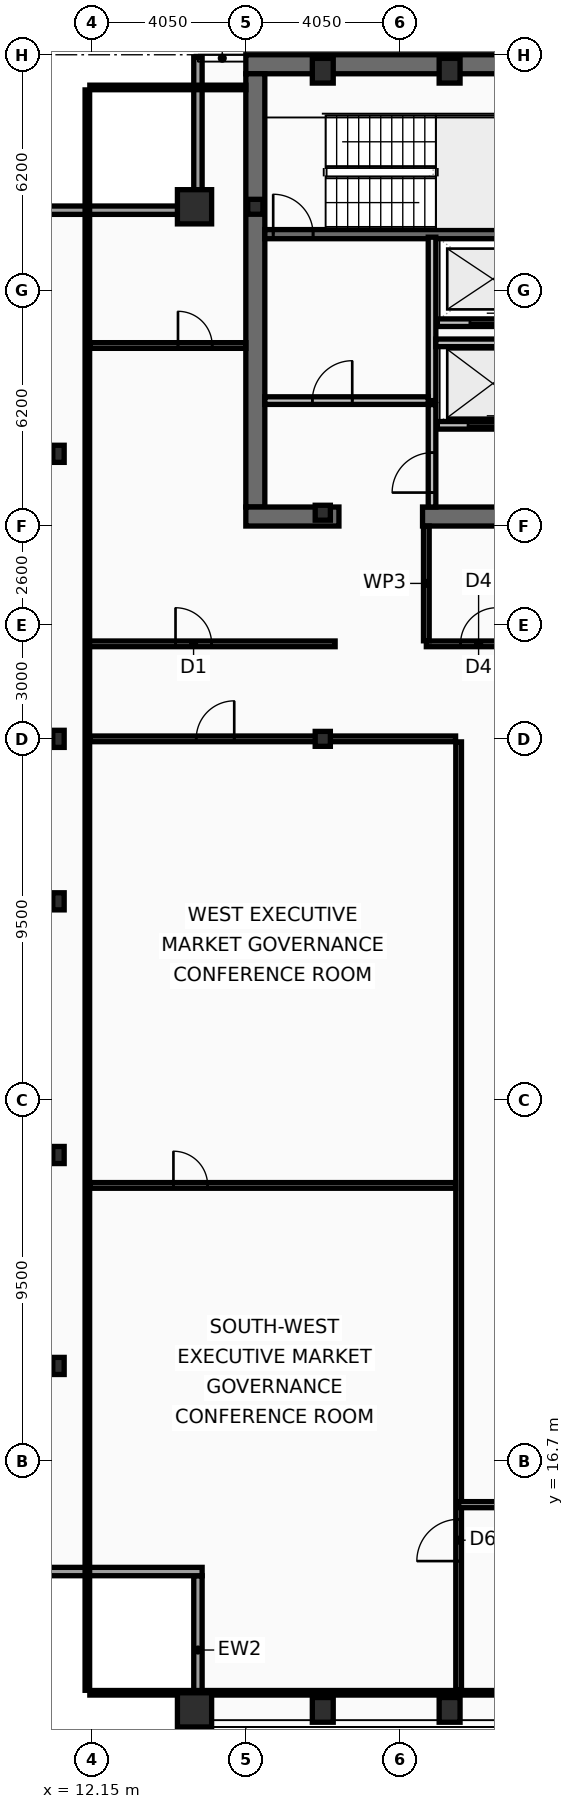
"""IFC4 building model, lengths in metres.
Left out: names, types, materials, properties, quantities, classifications, styles, units other than length and angle.
Written with IfcOpenShell. Run it as: python <this file> out.ifc"""

import sys

from ifc_helpers import new_model, si_unit, direction, frame, frame_2d, origin, origin_2d, place, context, subcontext, project, spatial, rectangle, hollow_rectangle, i_section, extrude, element, fill, save


model = new_model("IFC4")
c1 = context("Model", 3, precision=1e-05, world=origin(), true_north=direction((0.0, 1.0)))
c2 = subcontext(c1, "Body", "Model", "MODEL_VIEW")
j1 = project(units=[si_unit("LENGTHUNIT", "METRE"), si_unit("PLANEANGLEUNIT", "RADIAN")], contexts=[c1])
p1 = place(None, origin())
s1 = spatial("IfcSite", under=j1, at=p1, CompositionType="ELEMENT")
p2 = place(p1, origin())
s2 = spatial("IfcBuilding", under=s1, at=p2, CompositionType="ELEMENT")
p3 = place(p2, frame((0.0, 0.0, 347.0)))
s3 = spatial("IfcBuildingStorey", under=s2, at=p3, CompositionType="ELEMENT", Elevation=347.0)
p4 = place(p3, frame((16.2, 53.45, 0.0), z_axis=(0.0, 0.0, 1.0), x_axis=(1.0, 0.0, 0.0)))
e1 = element("IfcWall", 1, at=p4, inside=s3, PredefinedType="SHEAR", context=c2, shape_type="SweptSolid", body=[
    extrude(rectangle(XDim=40.5, YDim=0.5, at=frame_2d((20.25, 0.0))), origin(), (0.0, 0.0, 1.0), 3.38),
])
p5 = place(p3, frame((16.45, 41.8, 0.0), z_axis=(0.0, 0.0, 1.0), x_axis=(0.0, 1.0, 0.0)))
e2 = element("IfcWall", 2, at=p5, inside=s3, PredefinedType="SHEAR", context=c2, shape_type="SweptSolid", body=[
    extrude(rectangle(XDim=11.4, YDim=0.5, at=frame_2d((5.7, 0.0))), origin(), (0.0, 0.0, 1.0), 3.38),
])
p6 = place(p3, frame((18.65, 41.55, 0.0), z_axis=(0.0, 0.0, 1.0), x_axis=(-1.0, 0.0, 0.0)))
e3 = element("IfcWall", 3, at=p6, inside=s3, PredefinedType="SHEAR", context=c2, shape_type="SweptSolid", body=[
    extrude(rectangle(XDim=2.45, YDim=0.5, at=frame_2d((1.225, 0.0))), origin(), (0.0, 0.0, 1.0), 3.38),
])
p7 = place(p3, frame((32.3, 41.55, 0.0), z_axis=(0.0, 0.0, 1.0), x_axis=(-1.0, 0.0, 0.0)))
e4 = element("IfcWall", 4, at=p7, inside=s3, PredefinedType="SHEAR", context=c2, shape_type="SweptSolid", body=[
    extrude(rectangle(XDim=11.45, YDim=0.5, at=frame_2d((5.725, 0.0))), origin(), (0.0, 0.0, 1.0), 3.38),
])
p8 = place(p3, frame((16.7, 48.98, 0.0), z_axis=(0.0, 0.0, 1.0), x_axis=(1.0, 0.0, 0.0)))
e5 = element("IfcWall", 5, at=p8, inside=s3, PredefinedType="SHEAR", context=c2, shape_type="SweptSolid", body=[
    extrude(rectangle(XDim=7.52, YDim=0.24, at=frame_2d((3.76, 0.0))), origin(), (0.0, 0.0, 1.0), 3.38),
])
p9 = place(p8, frame((0.22, 0.0, 0.0)))
e6 = element("IfcOpeningElement", 6, at=p9, cuts=e5, PredefinedType="OPENING", context=c2, shape_type="SweptSolid", body=[
    extrude(rectangle(XDim=1.05, YDim=2.15, at=frame_2d((0.525, 1.075))), frame((0.0, 0.13, 0.0), z_axis=(0.0, -1.0, 0.0), x_axis=(1.0, 0.0, 0.0)), (0.0, 0.0, 1.0), 0.26),
])
for number, where, z_axis, x_axis in (
    (7, (14.85, 10.15, 0.0), (0.0, 0.0, 1.0), (1.0, 0.0, 0.0)),
    (8, (14.85, 49.7, 0.0), (0.0, 0.0, 1.0), (1.0, 0.0, 0.0)),
):
    element("IfcColumn", number, at=place(p3, frame(where, z_axis=z_axis, x_axis=x_axis)), inside=s3, PredefinedType="COLUMN", context=c2, shape_type="SweptSolid", body=[
        extrude(hollow_rectangle(XDim=0.9, YDim=0.9, WallThickness=0.05, at=origin_2d()), origin(), (0.0, 0.0, 1.0), 3.6),
    ])
for number, where, z_axis, x_axis in (
    (9, (18.225, 10.15, 0.0), (0.0, 0.0, 1.0), (1.0, 0.0, 0.0)),
    (10, (21.562, 10.15, 0.0), (0.0, 0.0, 1.0), (1.0, 0.0, 0.0)),
    (11, (18.225, 53.28, 0.0), (0.0, 0.0, 1.0), (1.0, 0.0, 0.0)),
    (12, (21.562, 53.28, 0.0), (0.0, 0.0, 1.0), (1.0, 0.0, 0.0)),
):
    element("IfcColumn", number, at=place(p3, frame(where, z_axis=z_axis, x_axis=x_axis)), inside=s3, PredefinedType="COLUMN", context=c2, shape_type="SweptSolid", body=[
        extrude(hollow_rectangle(XDim=0.55, YDim=0.65, WallThickness=0.04, at=origin_2d()), origin(), (0.0, 0.0, 1.0), 3.6),
    ])
for number, where, z_axis, x_axis in (
    (13, (11.27, 19.2, 0.0), (0.0, 0.0, 1.0), (1.0, 0.0, 0.0)),
    (14, (11.27, 24.75, 0.0), (0.0, 0.0, 1.0), (1.0, 0.0, 0.0)),
    (15, (11.27, 31.425, 0.0), (0.0, 0.0, 1.0), (1.0, 0.0, 0.0)),
    (16, (11.27, 35.7, 0.0), (0.0, 0.0, 1.0), (1.0, 0.0, 0.0)),
    (17, (11.27, 43.2, 0.0), (0.0, 0.0, 1.0), (1.0, 0.0, 0.0)),
):
    element("IfcColumn", number, at=place(p3, frame(where, z_axis=z_axis, x_axis=x_axis)), inside=s3, PredefinedType="COLUMN", context=c2, shape_type="SweptSolid", body=[
        extrude(i_section(OverallWidth=0.3, OverallDepth=0.45, WebThickness=0.014, FlangeThickness=0.026, at=origin_2d()), origin(), (0.0, 0.0, 1.0), 3.6),
    ])
for number, where, z_axis, x_axis in (
    (18, (16.45, 49.7, 0.0), (0.0, 0.0, 1.0), (1.0, 0.0, 0.0)),
    (19, (18.225, 35.7, 0.0), (0.0, 0.0, 1.0), (1.0, 0.0, 0.0)),
    (20, (18.225, 41.65, 0.0), (0.0, 0.0, 1.0), (1.0, 0.0, 0.0)),
):
    element("IfcColumn", number, at=place(p3, frame(where, z_axis=z_axis, x_axis=x_axis)), inside=s3, PredefinedType="COLUMN", context=c2, shape_type="SweptSolid", body=[
        extrude(i_section(OverallWidth=0.399, OverallDepth=0.393, WebThickness=0.023, FlangeThickness=0.037, at=origin_2d()), origin(), (0.0, 0.0, 1.0), 3.6),
    ])
p10 = place(p3, frame((14.94, 9.77, 0.0), z_axis=(0.0, 0.0, 1.0), x_axis=(0.0, 1.0, 0.0)))
e21 = element("IfcWall", 21, at=p10, inside=s3, PredefinedType="SOLIDWALL", context=c2, shape_type="SweptSolid", body=[
    extrude(rectangle(XDim=3.91, YDim=0.22, at=frame_2d((1.955, 0.0))), origin(), (0.0, 0.0, 1.0), 2.82),
])
for number, where, z_axis, x_axis in (
    (22, (15.05, 13.79, 0.0), (0.0, 0.0, 1.0), (-1.0, 0.0, 0.0)),
    (23, (10.92, 49.61, 0.0), (0.0, 0.0, 1.0), (1.0, 0.0, 0.0)),
):
    element("IfcWall", number, at=place(p3, frame(where, z_axis=z_axis, x_axis=x_axis)), inside=s3, PredefinedType="SOLIDWALL", context=c2, shape_type="SweptSolid", body=[
        extrude(rectangle(XDim=4.13, YDim=0.22, at=frame_2d((2.065, 0.0))), origin(), (0.0, 0.0, 1.0), 2.82),
    ])
p11 = place(p3, frame((14.94, 49.72, 0.0), z_axis=(0.0, 0.0, 1.0), x_axis=(0.0, 1.0, 0.0)))
e24 = element("IfcWall", 24, at=p11, inside=s3, PredefinedType="SOLIDWALL", context=c2, shape_type="SweptSolid", body=[
    extrude(rectangle(XDim=3.91, YDim=0.22, at=frame_2d((1.955, 0.0))), origin(), (0.0, 0.0, 1.0), 2.82),
])
p12 = place(p3, frame((24.21, 43.95, 0.0), z_axis=(0.0, 0.0, 1.0), x_axis=(-1.0, 0.0, 0.0)))
e25 = element("IfcWall", 25, at=p12, inside=s3, PredefinedType="PARTITIONING", context=c2, shape_type="SweptSolid", body=[
    extrude(rectangle(XDim=2.97, YDim=0.2, at=frame_2d((1.485, 0.0))), origin(), (0.0, 0.0, 1.0), 3.38),
])
p13 = place(p12, frame((0.86, 0.0, 0.0)))
e26 = element("IfcOpeningElement", 26, at=p13, cuts=e25, PredefinedType="OPENING", context=c2, shape_type="SweptSolid", body=[
    extrude(rectangle(XDim=1.3, YDim=2.18, at=frame_2d((0.65, 1.09))), frame((0.0, 0.11, 0.0), z_axis=(0.0, -1.0, 0.0), x_axis=(1.0, 0.0, 0.0)), (0.0, 0.0, 1.0), 0.22),
])
p14 = place(p3, frame((24.21, 46.65, 0.0), z_axis=(0.0, 0.0, 1.0), x_axis=(-1.0, 0.0, 0.0)))
e27 = element("IfcWall", 27, at=p14, inside=s3, PredefinedType="PARTITIONING", context=c2, shape_type="SweptSolid", body=[
    extrude(rectangle(XDim=2.97, YDim=0.2, at=frame_2d((1.485, 0.0))), origin(), (0.0, 0.0, 1.0), 3.38),
])
p15 = place(p14, frame((0.91, 0.0, 0.0)))
e28 = element("IfcOpeningElement", 28, at=p15, cuts=e27, PredefinedType="OPENING", context=c2, shape_type="SweptSolid", body=[
    extrude(rectangle(XDim=1.2, YDim=2.18, at=frame_2d((0.6, 1.09))), frame((0.0, 0.11, 0.0), z_axis=(0.0, -1.0, 0.0), x_axis=(1.0, 0.0, 0.0)), (0.0, 0.0, 1.0), 0.22),
])
p16 = place(p3, frame((21.1, 44.6, 0.0), z_axis=(0.0, 0.0, 1.0), x_axis=(0.0, 1.0, 0.0)))
e29 = element("IfcWall", 29, at=p16, inside=s3, PredefinedType="PARTITIONING", context=c2, shape_type="SweptSolid", body=[
    extrude(rectangle(XDim=4.3, YDim=0.2, at=frame_2d((2.15, 0.0))), origin(), (0.0, 0.0, 1.0), 3.38),
])
p17 = place(p3, frame((16.7, 44.6, 0.0), z_axis=(0.0, 0.0, 1.0), x_axis=(1.0, 0.0, 0.0)))
e30 = element("IfcWall", 30, at=p17, inside=s3, PredefinedType="PARTITIONING", context=c2, shape_type="SweptSolid", body=[
    extrude(rectangle(XDim=4.3, YDim=0.2, at=frame_2d((2.15, 0.0))), origin(), (0.0, 0.0, 1.0), 3.38),
])
p18 = place(p17, frame((1.25, 0.0, 0.0)))
e31 = element("IfcOpeningElement", 31, at=p18, cuts=e30, PredefinedType="OPENING", context=c2, shape_type="SweptSolid", body=[
    extrude(rectangle(XDim=1.05, YDim=2.15, at=frame_2d((0.525, 1.075))), frame((0.0, 0.11, 0.0), z_axis=(0.0, -1.0, 0.0), x_axis=(1.0, 0.0, 0.0)), (0.0, 0.0, 1.0), 0.22),
])
p19 = place(p3, frame((21.2, 46.12, 0.0), z_axis=(0.0, 0.0, 1.0), x_axis=(1.0, 0.0, 0.0)))
e32 = element("IfcWall", 32, at=p19, inside=s3, PredefinedType="PARTITIONING", context=c2, shape_type="SweptSolid", body=[
    extrude(rectangle(XDim=3.02, YDim=0.2, at=frame_2d((1.51, 0.0))), origin(), (0.0, 0.0, 1.0), 3.38),
])
p20 = place(p3, frame((21.1, 41.8, 0.0), z_axis=(0.0, 0.0, 1.0), x_axis=(0.0, 1.0, 0.0)))
e33 = element("IfcWall", 33, at=p20, inside=s3, PredefinedType="PARTITIONING", context=c2, shape_type="SweptSolid", body=[
    extrude(rectangle(XDim=2.695, YDim=0.2, at=frame_2d((1.348, 0.0))), origin(), (0.0, 0.0, 1.0), 3.38),
])
p21 = place(p20, frame((0.38, 0.0, 0.0)))
e34 = element("IfcOpeningElement", 34, at=p21, cuts=e33, PredefinedType="OPENING", context=c2, shape_type="SweptSolid", body=[
    extrude(rectangle(XDim=1.05, YDim=2.15, at=frame_2d((0.525, 1.075))), frame((0.0, 0.11, 0.0), z_axis=(0.0, -1.0, 0.0), x_axis=(1.0, 0.0, 0.0)), (0.0, 0.0, 1.0), 0.22),
])
p22 = place(p3, frame((20.95, 38.2, 0.0), z_axis=(0.0, 0.0, 1.0), x_axis=(1.0, 0.0, 0.0)))
e35 = element("IfcWall", 35, at=p22, inside=s3, PredefinedType="PARTITIONING", context=c2, shape_type="SweptSolid", body=[
    extrude(rectangle(XDim=3.75, YDim=0.15, at=frame_2d((1.875, 0.0))), origin(), (0.0, 0.0, 1.0), 2.77),
])
p23 = place(p22, frame((0.9, 0.0, 0.0)))
e36 = element("IfcOpeningElement", 36, at=p23, cuts=e35, PredefinedType="OPENING", context=c2, shape_type="SweptSolid", body=[
    extrude(rectangle(XDim=0.95, YDim=2.05, at=frame_2d((0.475, 1.025))), frame((0.0, 0.085, 0.0), z_axis=(0.0, -1.0, 0.0), x_axis=(1.0, 0.0, 0.0)), (0.0, 0.0, 1.0), 0.17),
])
p24 = place(p3, frame((20.95, 38.28, 0.0), z_axis=(0.0, 0.0, 1.0), x_axis=(0.0, 1.0, 0.0)))
e37 = element("IfcWall", 37, at=p24, inside=s3, PredefinedType="PARTITIONING", context=c2, shape_type="SweptSolid", body=[
    extrude(rectangle(XDim=3.02, YDim=0.15, at=frame_2d((1.51, 0.0))), origin(), (0.0, 0.0, 1.0), 3.38),
])
p25 = place(p3, frame((12.03, 38.2, 0.0), z_axis=(0.0, 0.0, 1.0), x_axis=(1.0, 0.0, 0.0)))
e38 = element("IfcWall", 38, at=p25, inside=s3, PredefinedType="PARTITIONING", context=c2, shape_type="SweptSolid", body=[
    extrude(rectangle(XDim=6.52, YDim=0.15, at=frame_2d((3.26, 0.0))), origin(), (0.0, 0.0, 1.0), 2.77),
])
p26 = place(p25, frame((2.32, 0.0, 0.0)))
e39 = element("IfcOpeningElement", 39, at=p26, cuts=e38, PredefinedType="OPENING", context=c2, shape_type="SweptSolid", body=[
    extrude(rectangle(XDim=0.95, YDim=2.05, at=frame_2d((0.475, 1.025))), frame((0.0, 0.085, 0.0), z_axis=(0.0, -1.0, 0.0), x_axis=(1.0, 0.0, 0.0)), (0.0, 0.0, 1.0), 0.17),
])
p27 = place(p3, frame((12.095, 46.05, 0.0), z_axis=(0.0, 0.0, 1.0), x_axis=(1.0, 0.0, 0.0)))
e40 = element("IfcWall", 40, at=p27, inside=s3, PredefinedType="PARTITIONING", context=c2, shape_type="SweptSolid", body=[
    extrude(rectangle(XDim=4.105, YDim=0.15, at=frame_2d((2.052, 0.0))), origin(), (0.0, 0.0, 1.0), 2.82),
])
p28 = place(p27, frame((2.32, 0.0, 0.0)))
e41 = element("IfcOpeningElement", 41, at=p28, cuts=e40, PredefinedType="OPENING", context=c2, shape_type="SweptSolid", body=[
    extrude(rectangle(XDim=0.9, YDim=2.05, at=frame_2d((0.45, 1.025))), frame((0.0, 0.085, 0.0), z_axis=(0.0, -1.0, 0.0), x_axis=(1.0, 0.0, 0.0)), (0.0, 0.0, 1.0), 0.17),
])
p29 = place(p3, frame((21.8, 10.665, 0.0), z_axis=(0.0, 0.0, 1.0), x_axis=(0.0, 1.0, 0.0)))
e42 = element("IfcWall", 42, at=p29, inside=s3, PredefinedType="PARTITIONING", context=c2, shape_type="SweptSolid", body=[
    extrude(rectangle(XDim=24.955, YDim=0.15, at=frame_2d((12.478, 0.0))), origin(), (0.0, 0.0, 1.0), 3.01),
])
p30 = place(p29, frame((3.4, 0.0, 0.0)))
e43 = element("IfcOpeningElement", 43, at=p30, cuts=e42, PredefinedType="OPENING", context=c2, shape_type="SweptSolid", body=[
    extrude(rectangle(XDim=1.1, YDim=2.1, at=frame_2d((0.55, 1.05))), frame((0.0, 0.085, 0.0), z_axis=(0.0, -1.0, 0.0), x_axis=(1.0, 0.0, 0.0)), (0.0, 0.0, 1.0), 0.17),
])
p31 = place(p3, frame((12.095, 35.7, 0.0), z_axis=(0.0, 0.0, 1.0), x_axis=(1.0, 0.0, 0.0)))
e44 = element("IfcWall", 44, at=p31, inside=s3, PredefinedType="PARTITIONING", context=c2, shape_type="SweptSolid", body=[
    extrude(rectangle(XDim=9.625, YDim=0.15, at=frame_2d((4.812, 0.0))), origin(), (0.0, 0.0, 1.0), 2.77),
])
p32 = place(p31, frame((2.8, 0.0, 0.0)))
e45 = element("IfcOpeningElement", 45, at=p32, cuts=e44, PredefinedType="OPENING", context=c2, shape_type="SweptSolid", body=[
    extrude(rectangle(XDim=1.0, YDim=2.05, at=frame_2d((0.5, 1.025))), frame((0.0, 0.085, 0.0), z_axis=(0.0, -1.0, 0.0), x_axis=(1.0, 0.0, 0.0)), (0.0, 0.0, 1.0), 0.17),
])
p33 = place(p3, frame((12.095, 23.95, 0.0), z_axis=(0.0, 0.0, 1.0), x_axis=(1.0, 0.0, 0.0)))
e46 = element("IfcWall", 46, at=p33, inside=s3, PredefinedType="PARTITIONING", context=c2, shape_type="SweptSolid", body=[
    extrude(rectangle(XDim=9.625, YDim=0.15, at=frame_2d((4.812, 0.0))), origin(), (0.0, 0.0, 1.0), 2.77),
])
p34 = place(p33, frame((2.2, 0.0, 0.0)))
e47 = element("IfcOpeningElement", 47, at=p34, cuts=e46, PredefinedType="OPENING", context=c2, shape_type="SweptSolid", body=[
    extrude(rectangle(XDim=0.9, YDim=2.05, at=frame_2d((0.45, 1.025))), frame((0.0, 0.085, 0.0), z_axis=(0.0, -1.0, 0.0), x_axis=(1.0, 0.0, 0.0)), (0.0, 0.0, 1.0), 0.17),
])
p35 = place(p3, frame((21.8, 15.55, 0.0), z_axis=(0.0, 0.0, 1.0), x_axis=(1.0, 0.0, 0.0)))
e48 = element("IfcWall", 48, at=p35, inside=s3, PredefinedType="PARTITIONING", context=c2, shape_type="SweptSolid", body=[
    extrude(rectangle(XDim=7.576, YDim=0.16, at=frame_2d((3.788, 0.0))), origin(), (0.0, 0.0, 1.0), 2.77),
])
p36 = place(p35, frame((3.682, 0.0, 0.0)))
e49 = element("IfcOpeningElement", 49, at=p36, cuts=e48, PredefinedType="OPENING", context=c2, shape_type="SweptSolid", body=[
    extrude(rectangle(XDim=1.0, YDim=2.05, at=frame_2d((0.5, 1.025))), frame((0.0, 0.09, 0.0), z_axis=(0.0, -1.0, 0.0), x_axis=(1.0, 0.0, 0.0)), (0.0, 0.0, 1.0), 0.18),
])
p37 = place(p3, frame((12.03, 10.665, 0.0), z_axis=(0.0, 0.0, 1.0), x_axis=(0.0, 1.0, 0.0)))
e50 = element("IfcWall", 50, at=p37, inside=s3, PredefinedType="PARTITIONING", context=c2, shape_type="SweptSolid", body=[
    extrude(rectangle(XDim=42.11, YDim=0.12, at=frame_2d((21.055, 0.0))), origin(), (0.0, 0.0, 1.0), 2.77),
])
p38 = place(p3, frame((12.095, 52.84, 0.0), z_axis=(0.0, 0.0, 1.0), x_axis=(1.0, 0.0, 0.0)))
e51 = element("IfcWall", 51, at=p38, inside=s3, PredefinedType="PARTITIONING", context=c2, shape_type="SweptSolid", body=[
    extrude(rectangle(XDim=4.105, YDim=0.12, at=frame_2d((2.052, 0.0))), origin(), (0.0, 0.0, 1.0), 3.38),
])
p39 = place(p3, frame((12.095, 10.6, 0.0), z_axis=(0.0, 0.0, 1.0), x_axis=(1.0, 0.0, 0.0)))
e52 = element("IfcWall", 52, at=p39, inside=s3, PredefinedType="PARTITIONING", context=c2, shape_type="SweptSolid", body=[
    extrude(rectangle(XDim=48.71, YDim=0.12, at=frame_2d((24.355, 0.0))), origin(), (0.0, 0.0, 1.0), 2.77),
])
p40 = place(p9, origin())
e53 = element("IfcDoor", 53, at=p40, inside=s3, OperationType="SINGLE_SWING_LEFT", PredefinedType="DOOR", context=c2, shape_type="SweptSolid", body=[
    extrude(rectangle(XDim=1.05, YDim=2.15, at=frame_2d((0.525, 1.075))), frame((0.0, 0.025, 0.0), z_axis=(0.0, -1.0, 0.0), x_axis=(1.0, 0.0, 0.0)), (0.0, 0.0, 1.0), 0.05),
])
fill(e6, e53)
p41 = place(p13, origin())
e54 = element("IfcDoor", 54, at=p41, inside=s3, OperationType="SLIDING_TO_LEFT", PredefinedType="DOOR", context=c2, shape_type="SweptSolid", body=[
    extrude(rectangle(XDim=1.3, YDim=2.18, at=frame_2d((0.65, 1.09))), frame((0.0, 0.025, 0.0), z_axis=(0.0, -1.0, 0.0), x_axis=(1.0, 0.0, 0.0)), (0.0, 0.0, 1.0), 0.05),
])
fill(e26, e54)
p42 = place(p15, origin())
e55 = element("IfcDoor", 55, at=p42, inside=s3, OperationType="SLIDING_TO_LEFT", PredefinedType="DOOR", context=c2, shape_type="SweptSolid", body=[
    extrude(rectangle(XDim=1.2, YDim=2.18, at=frame_2d((0.6, 1.09))), frame((0.0, 0.025, 0.0), z_axis=(0.0, -1.0, 0.0), x_axis=(1.0, 0.0, 0.0)), (0.0, 0.0, 1.0), 0.05),
])
fill(e28, e55)
p43 = place(p18, origin())
e56 = element("IfcDoor", 56, at=p43, inside=s3, OperationType="SINGLE_SWING_RIGHT", PredefinedType="DOOR", context=c2, shape_type="SweptSolid", body=[
    extrude(rectangle(XDim=1.05, YDim=2.15, at=frame_2d((0.525, 1.075))), frame((0.0, 0.025, 0.0), z_axis=(0.0, -1.0, 0.0), x_axis=(1.0, 0.0, 0.0)), (0.0, 0.0, 1.0), 0.05),
])
fill(e31, e56)
p44 = place(p21, origin())
e57 = element("IfcDoor", 57, at=p44, inside=s3, OperationType="SINGLE_SWING_LEFT", PredefinedType="DOOR", context=c2, shape_type="SweptSolid", body=[
    extrude(rectangle(XDim=1.05, YDim=2.15, at=frame_2d((0.525, 1.075))), frame((0.0, 0.025, 0.0), z_axis=(0.0, -1.0, 0.0), x_axis=(1.0, 0.0, 0.0)), (0.0, 0.0, 1.0), 0.05),
])
fill(e34, e57)
p45 = place(p23, origin())
e58 = element("IfcDoor", 58, at=p45, inside=s3, OperationType="SINGLE_SWING_RIGHT", PredefinedType="DOOR", context=c2, shape_type="SweptSolid", body=[
    extrude(rectangle(XDim=0.95, YDim=2.05, at=frame_2d((0.475, 1.025))), frame((0.0, 0.025, 0.0), z_axis=(0.0, -1.0, 0.0), x_axis=(1.0, 0.0, 0.0)), (0.0, 0.0, 1.0), 0.05),
])
fill(e36, e58)
p46 = place(p26, origin())
e59 = element("IfcDoor", 59, at=p46, inside=s3, OperationType="SINGLE_SWING_LEFT", PredefinedType="DOOR", context=c2, shape_type="SweptSolid", body=[
    extrude(rectangle(XDim=0.95, YDim=2.05, at=frame_2d((0.475, 1.025))), frame((0.0, 0.025, 0.0), z_axis=(0.0, -1.0, 0.0), x_axis=(1.0, 0.0, 0.0)), (0.0, 0.0, 1.0), 0.05),
])
fill(e39, e59)
p47 = place(p28, origin())
e60 = element("IfcDoor", 60, at=p47, inside=s3, OperationType="SINGLE_SWING_LEFT", PredefinedType="DOOR", context=c2, shape_type="SweptSolid", body=[
    extrude(rectangle(XDim=0.9, YDim=2.05, at=frame_2d((0.45, 1.025))), frame((0.0, 0.025, 0.0), z_axis=(0.0, -1.0, 0.0), x_axis=(1.0, 0.0, 0.0)), (0.0, 0.0, 1.0), 0.05),
])
fill(e41, e60)
p48 = place(p30, origin())
e61 = element("IfcDoor", 61, at=p48, inside=s3, OperationType="SINGLE_SWING_LEFT", PredefinedType="DOOR", context=c2, shape_type="SweptSolid", body=[
    extrude(rectangle(XDim=1.1, YDim=2.1, at=frame_2d((0.55, 1.05))), frame((0.0, 0.025, 0.0), z_axis=(0.0, -1.0, 0.0), x_axis=(1.0, 0.0, 0.0)), (0.0, 0.0, 1.0), 0.05),
])
fill(e43, e61)
p49 = place(p32, origin())
e62 = element("IfcDoor", 62, at=p49, inside=s3, OperationType="SINGLE_SWING_RIGHT", PredefinedType="DOOR", context=c2, shape_type="SweptSolid", body=[
    extrude(rectangle(XDim=1.0, YDim=2.05, at=frame_2d((0.5, 1.025))), frame((0.0, 0.025, 0.0), z_axis=(0.0, -1.0, 0.0), x_axis=(1.0, 0.0, 0.0)), (0.0, 0.0, 1.0), 0.05),
])
fill(e45, e62)
p50 = place(p34, origin())
e63 = element("IfcDoor", 63, at=p50, inside=s3, OperationType="SINGLE_SWING_LEFT", PredefinedType="DOOR", context=c2, shape_type="SweptSolid", body=[
    extrude(rectangle(XDim=0.9, YDim=2.05, at=frame_2d((0.45, 1.025))), frame((0.0, 0.025, 0.0), z_axis=(0.0, -1.0, 0.0), x_axis=(1.0, 0.0, 0.0)), (0.0, 0.0, 1.0), 0.05),
])
fill(e47, e63)
save(model, sys.argv[1])
